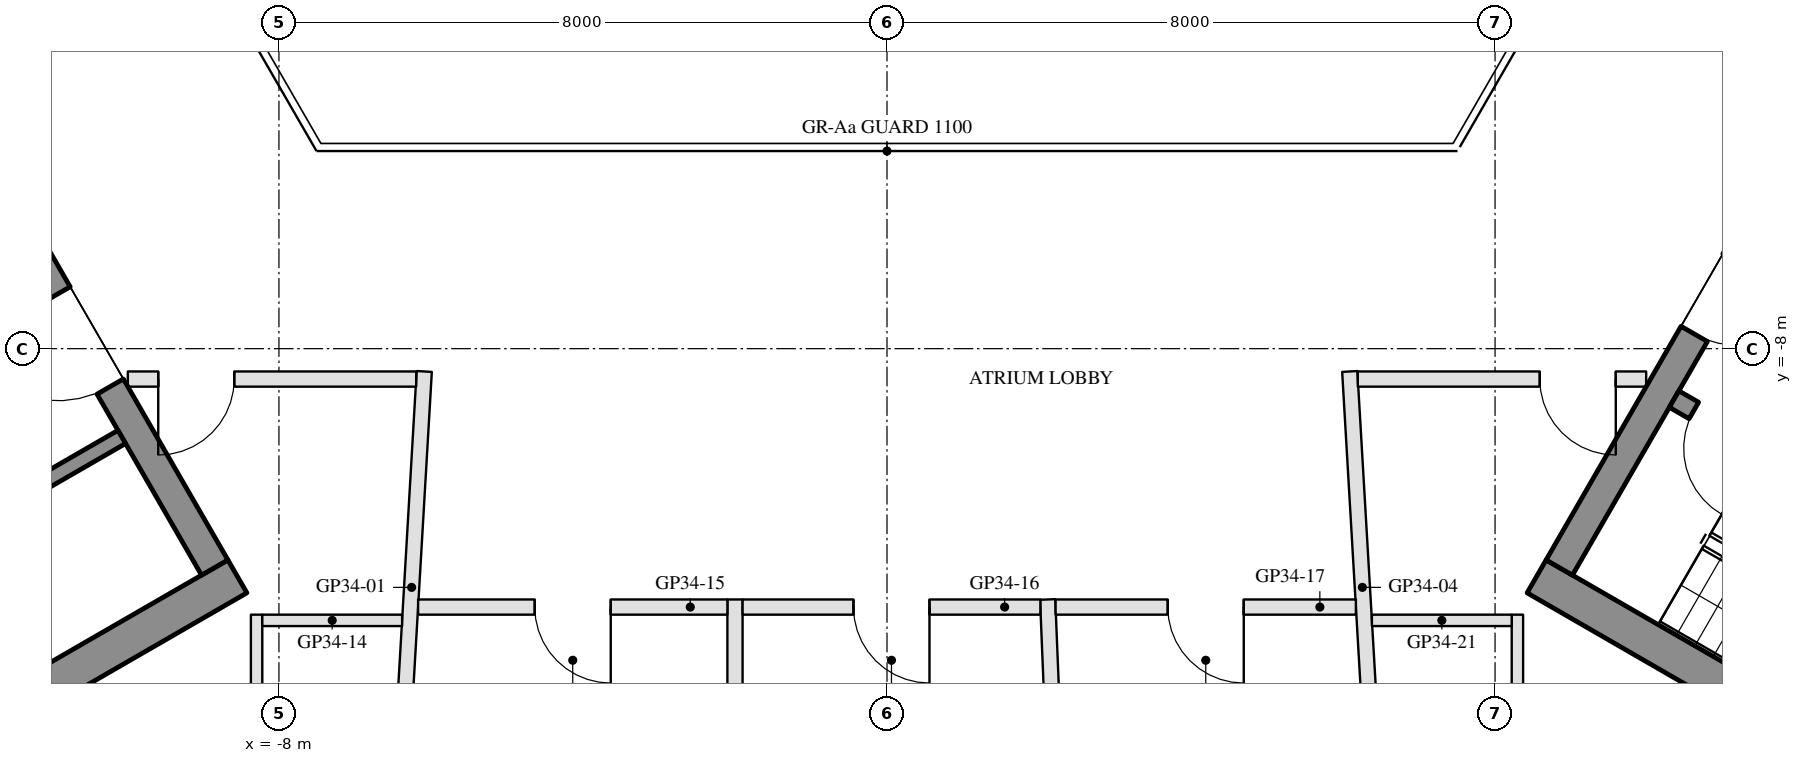
"""IFC4 building model, lengths in metres.
Left out: names, types, materials, properties, quantities, classifications, styles, units other than length and angle.
Written with IfcOpenShell. Run it as: python <this file> out.ifc"""

import sys

from ifc_helpers import new_model, si_unit, direction, frame, frame_2d, origin, place, context, subcontext, project, spatial, rectangle, extrude, element, fill, save


model = new_model("IFC4")
c1 = context("Model", 3, precision=1e-05, world=origin(), true_north=direction((0.0, 1.0)))
c2 = subcontext(c1, "Body", "Model", "MODEL_VIEW")
j1 = project(units=[si_unit("LENGTHUNIT", "METRE"), si_unit("PLANEANGLEUNIT", "RADIAN")], contexts=[c1])
p1 = place(None, origin())
s1 = spatial("IfcSite", under=j1, at=p1, CompositionType="ELEMENT")
p2 = place(p1, origin())
s2 = spatial("IfcBuilding", under=s1, at=p2, CompositionType="ELEMENT")
p3 = place(p2, frame((0.0, 0.0, 320.7)))
s3 = spatial("IfcBuildingStorey", under=s2, at=p3, CompositionType="ELEMENT", Elevation=320.7)
p4 = place(p3, frame((-8.547, -10.997, 0.0), z_axis=(0.0, 0.0, 1.0), x_axis=(-0.866025286072, -0.500000203884, 0.0)))
e1 = element("IfcWall", 1, at=p4, inside=s3, PredefinedType="SHEAR", context=c2, shape_type="SweptSolid", body=[
    extrude(rectangle(XDim=9.283, YDim=0.5, at=frame_2d((4.641, 0.0))), origin(), (0.0, 0.0, 1.0), 3.5),
])
p5 = place(p3, frame((-13.845, -2.22, 0.0), z_axis=(0.0, 0.0, 1.0), x_axis=(0.500004234368, -0.866022959057, 0.0)))
e2 = element("IfcWall", 2, at=p5, inside=s3, PredefinedType="SHEAR", context=c2, shape_type="SweptSolid", body=[
    extrude(rectangle(XDim=10.0, YDim=0.4, at=frame_2d((5.0, 0.0))), origin(), (0.0, 0.0, 1.0), 3.5),
])
p6 = place(p5, frame((3.55, 0.0, 0.0)))
e3 = element("IfcOpeningElement", 3, at=p6, cuts=e2, PredefinedType="OPENING", context=c2, shape_type="SweptSolid", body=[
    extrude(rectangle(XDim=1.1, YDim=2.1, at=frame_2d((0.55, 1.05))), frame((0.0, 0.21, 0.0), z_axis=(0.0, -1.0, 0.0), x_axis=(1.0, 0.0, 0.0)), (0.0, 0.0, 1.0), 0.42),
])
p7 = place(p5, frame((5.85, 0.0, 0.0)))
e4 = element("IfcOpeningElement", 4, at=p7, cuts=e2, PredefinedType="OPENING", context=c2, shape_type="SweptSolid", body=[
    extrude(rectangle(XDim=1.4, YDim=2.1, at=frame_2d((0.7, 1.05))), frame((0.0, 0.21, 0.0), z_axis=(0.0, -1.0, 0.0), x_axis=(1.0, 0.0, 0.0)), (0.0, 0.0, 1.0), 0.42),
])
p8 = place(p3, frame((-10.068, -9.162, 0.0), z_axis=(0.0, 0.0, 1.0), x_axis=(-0.866030125237, -0.499991822116, 0.0)))
e5 = element("IfcWall", 5, at=p8, inside=s3, PredefinedType="SHEAR", context=c2, shape_type="SweptSolid", body=[
    extrude(rectangle(XDim=10.121, YDim=0.2, at=frame_2d((5.061, 0.0))), origin(), (0.0, 0.0, 1.0), 3.5),
])
p9 = place(p8, frame((1.99, 0.0, 0.0)))
e6 = element("IfcOpeningElement", 6, at=p9, cuts=e5, PredefinedType="OPENING", context=c2, shape_type="SweptSolid", body=[
    extrude(rectangle(XDim=0.9, YDim=2.1, at=frame_2d((0.45, 1.05))), frame((0.0, 0.11, 0.0), z_axis=(0.0, -1.0, 0.0), x_axis=(1.0, 0.0, 0.0)), (0.0, 0.0, 1.0), 0.22),
])
p10 = place(p8, frame((7.07, 0.0, 0.0)))
e7 = element("IfcOpeningElement", 7, at=p10, cuts=e5, PredefinedType="OPENING", context=c2, shape_type="SweptSolid", body=[
    extrude(rectangle(XDim=0.9, YDim=2.1, at=frame_2d((0.45, 1.05))), frame((0.0, 0.11, 0.0), z_axis=(0.0, -1.0, 0.0), x_axis=(1.0, 0.0, 0.0)), (0.0, 0.0, 1.0), 0.22),
])
p11 = place(p3, frame((8.547, -10.997, 0.0), z_axis=(0.0, 0.0, 1.0), x_axis=(0.866025286072, -0.500000203884, 0.0)))
e8 = element("IfcWall", 8, at=p11, inside=s3, PredefinedType="SHEAR", context=c2, shape_type="SweptSolid", body=[
    extrude(rectangle(XDim=9.283, YDim=0.5, at=frame_2d((4.641, 0.0))), origin(), (0.0, 0.0, 1.0), 3.5),
])
p12 = place(p3, frame((8.845, -10.88, 0.0), z_axis=(0.0, 0.0, 1.0), x_axis=(0.500004234368, 0.866022959057, 0.0)))
e9 = element("IfcWall", 9, at=p12, inside=s3, PredefinedType="SHEAR", context=c2, shape_type="SweptSolid", body=[
    extrude(rectangle(XDim=10.0, YDim=0.4, at=frame_2d((5.0, 0.0))), origin(), (0.0, 0.0, 1.0), 3.5),
])
p13 = place(p12, frame((3.55, 0.0, 0.0)))
e10 = element("IfcOpeningElement", 10, at=p13, cuts=e9, PredefinedType="OPENING", context=c2, shape_type="SweptSolid", body=[
    extrude(rectangle(XDim=1.1, YDim=2.1, at=frame_2d((0.55, 1.05))), frame((0.0, 0.21, 0.0), z_axis=(0.0, -1.0, 0.0), x_axis=(1.0, 0.0, 0.0)), (0.0, 0.0, 1.0), 0.42),
])
p14 = place(p12, frame((5.85, 0.0, 0.0)))
e11 = element("IfcOpeningElement", 11, at=p14, cuts=e9, PredefinedType="OPENING", context=c2, shape_type="SweptSolid", body=[
    extrude(rectangle(XDim=1.4, YDim=2.1, at=frame_2d((0.7, 1.05))), frame((0.0, 0.21, 0.0), z_axis=(0.0, -1.0, 0.0), x_axis=(1.0, 0.0, 0.0)), (0.0, 0.0, 1.0), 0.42),
])
p15 = place(p3, frame((10.356, -8.664, 0.0), z_axis=(0.0, 0.0, 1.0), x_axis=(0.866028629588, -0.499994412703, 0.0)))
e12 = element("IfcWall", 12, at=p15, inside=s3, PredefinedType="SHEAR", context=c2, shape_type="SweptSolid", body=[
    extrude(rectangle(XDim=6.45, YDim=0.25, at=frame_2d((3.225, 0.0))), origin(), (0.0, 0.0, 1.0), 3.5),
])
p16 = place(p15, frame((0.3, 0.0, 0.0)))
e13 = element("IfcOpeningElement", 13, at=p16, cuts=e12, PredefinedType="OPENING", context=c2, shape_type="SweptSolid", body=[
    extrude(rectangle(XDim=1.0, YDim=2.1, at=frame_2d((0.5, 1.05))), frame((0.0, 0.135, 0.0), z_axis=(0.0, -1.0, 0.0), x_axis=(1.0, 0.0, 0.0)), (0.0, 0.0, 1.0), 0.27),
])
p17 = place(p3, frame((-6.42, -13.982, 0.0), z_axis=(0.0, 0.0, 1.0), x_axis=(0.058254288977, 0.998301776927, 0.0)))
e14 = element("IfcWall", 14, at=p17, inside=s3, PredefinedType="PARTITIONING", context=c2, shape_type="SweptSolid", body=[
    extrude(rectangle(XDim=5.691, YDim=0.2, at=frame_2d((2.846, 0.0))), origin(), (0.0, 0.0, 1.0), 3.15),
])
p18 = place(p3, frame((-2.0, -14.978, 0.0), z_axis=(0.0, 0.0, 1.0), x_axis=(0.0, 1.0, 0.0)))
e15 = element("IfcWall", 15, at=p18, inside=s3, PredefinedType="PARTITIONING", context=c2, shape_type="SweptSolid", body=[
    extrude(rectangle(XDim=3.677, YDim=0.2, at=frame_2d((1.839, 0.0))), origin(), (0.0, 0.0, 1.0), 3.1),
])
p19 = place(p3, frame((2.3, -15.877, 0.0), z_axis=(0.0, 0.0, 1.0), x_axis=(-0.040608643031, 0.999175128849, 0.0)))
e16 = element("IfcWall", 16, at=p19, inside=s3, PredefinedType="PARTITIONING", context=c2, shape_type="SweptSolid", body=[
    extrude(rectangle(XDim=4.581, YDim=0.2, at=frame_2d((2.291, 0.0))), origin(), (0.0, 0.0, 1.0), 3.1),
])
p20 = place(p3, frame((6.42, -13.982, 0.0), z_axis=(0.0, 0.0, 1.0), x_axis=(-0.058254288977, 0.998301776927, 0.0)))
e17 = element("IfcWall", 17, at=p20, inside=s3, PredefinedType="PARTITIONING", context=c2, shape_type="SweptSolid", body=[
    extrude(rectangle(XDim=5.691, YDim=0.2, at=frame_2d((2.846, 0.0))), origin(), (0.0, 0.0, 1.0), 3.15),
])
p21 = place(p3, frame((-6.194, -8.4, 0.0), z_axis=(0.0, 0.0, 1.0), x_axis=(-1.0, 0.0, 0.0)))
e18 = element("IfcWall", 18, at=p21, inside=s3, PredefinedType="PARTITIONING", context=c2, shape_type="SweptSolid", body=[
    extrude(rectangle(XDim=3.794, YDim=0.2, at=frame_2d((1.897, 0.0))), origin(), (0.0, 0.0, 1.0), 3.15),
])
p22 = place(p21, frame((2.394, 0.0, 0.0)))
e19 = element("IfcOpeningElement", 19, at=p22, cuts=e18, PredefinedType="OPENING", context=c2, shape_type="SweptSolid", body=[
    extrude(rectangle(XDim=1.0, YDim=2.1, at=frame_2d((0.5, 1.05))), frame((0.0, 0.11, 0.0), z_axis=(0.0, -1.0, 0.0), x_axis=(1.0, 0.0, 0.0)), (0.0, 0.0, 1.0), 0.22),
])
p23 = place(p3, frame((-8.294, -11.5, 0.0), z_axis=(0.0, 0.0, 1.0), x_axis=(0.0, -1.0, 0.0)))
e20 = element("IfcWall", 20, at=p23, inside=s3, PredefinedType="PARTITIONING", context=c2, shape_type="SweptSolid", body=[
    extrude(rectangle(XDim=2.8, YDim=0.15, at=frame_2d((1.4, 0.0))), origin(), (0.0, 0.0, 1.0), 3.1),
])
p24 = place(p23, frame((1.4, 0.0, 0.0)))
e21 = element("IfcOpeningElement", 21, at=p24, cuts=e20, PredefinedType="OPENING", context=c2, shape_type="SweptSolid", body=[
    extrude(rectangle(XDim=0.9, YDim=2.1, at=frame_2d((0.45, 1.05))), frame((0.0, 0.085, 0.0), z_axis=(0.0, -1.0, 0.0), x_axis=(1.0, 0.0, 0.0)), (0.0, 0.0, 1.0), 0.17),
])
p25 = place(p3, frame((-8.219, -11.575, 0.0), z_axis=(0.0, 0.0, 1.0), x_axis=(1.0, 0.0, 0.0)))
e22 = element("IfcWall", 22, at=p25, inside=s3, PredefinedType="PARTITIONING", context=c2, shape_type="SweptSolid", body=[
    extrude(rectangle(XDim=1.839, YDim=0.15, at=frame_2d((0.92, 0.0))), origin(), (0.0, 0.0, 1.0), 3.15),
])
p26 = place(p3, frame((-2.1, -11.4, 0.0), z_axis=(0.0, 0.0, 1.0), x_axis=(-1.0, 0.0, 0.0)))
e23 = element("IfcWall", 23, at=p26, inside=s3, PredefinedType="PARTITIONING", context=c2, shape_type="SweptSolid", body=[
    extrude(rectangle(XDim=4.069, YDim=0.2, at=frame_2d((2.035, 0.0))), origin(), (0.0, 0.0, 1.0), 3.15),
])
p27 = place(p26, frame((1.535, 0.0, 0.0)))
e24 = element("IfcOpeningElement", 24, at=p27, cuts=e23, PredefinedType="OPENING", context=c2, shape_type="SweptSolid", body=[
    extrude(rectangle(XDim=1.0, YDim=2.1, at=frame_2d((0.5, 1.05))), frame((0.0, 0.11, 0.0), z_axis=(0.0, -1.0, 0.0), x_axis=(1.0, 0.0, 0.0)), (0.0, 0.0, 1.0), 0.22),
])
p28 = place(p3, frame((2.018, -11.4, 0.0), z_axis=(0.0, 0.0, 1.0), x_axis=(-1.0, 0.0, 0.0)))
e25 = element("IfcWall", 25, at=p28, inside=s3, PredefinedType="PARTITIONING", context=c2, shape_type="SweptSolid", body=[
    extrude(rectangle(XDim=3.918, YDim=0.2, at=frame_2d((1.959, 0.0))), origin(), (0.0, 0.0, 1.0), 3.15),
])
p29 = place(p28, frame((1.459, 0.0, 0.0)))
e26 = element("IfcOpeningElement", 26, at=p29, cuts=e25, PredefinedType="OPENING", context=c2, shape_type="SweptSolid", body=[
    extrude(rectangle(XDim=1.0, YDim=2.1, at=frame_2d((0.5, 1.05))), frame((0.0, 0.11, 0.0), z_axis=(0.0, -1.0, 0.0), x_axis=(1.0, 0.0, 0.0)), (0.0, 0.0, 1.0), 0.22),
])
p30 = place(p3, frame((6.169, -11.4, 0.0), z_axis=(0.0, 0.0, 1.0), x_axis=(-1.0, 0.0, 0.0)))
e27 = element("IfcWall", 27, at=p30, inside=s3, PredefinedType="PARTITIONING", context=c2, shape_type="SweptSolid", body=[
    extrude(rectangle(XDim=3.951, YDim=0.2, at=frame_2d((1.976, 0.0))), origin(), (0.0, 0.0, 1.0), 3.15),
])
p31 = place(p30, frame((1.476, 0.0, 0.0)))
e28 = element("IfcOpeningElement", 28, at=p31, cuts=e27, PredefinedType="OPENING", context=c2, shape_type="SweptSolid", body=[
    extrude(rectangle(XDim=1.0, YDim=2.1, at=frame_2d((0.5, 1.05))), frame((0.0, 0.11, 0.0), z_axis=(0.0, -1.0, 0.0), x_axis=(1.0, 0.0, 0.0)), (0.0, 0.0, 1.0), 0.22),
])
p32 = place(p3, frame((9.988, -8.4, 0.0), z_axis=(0.0, 0.0, 1.0), x_axis=(-1.0, 0.0, 0.0)))
e29 = element("IfcWall", 29, at=p32, inside=s3, PredefinedType="PARTITIONING", context=c2, shape_type="SweptSolid", body=[
    extrude(rectangle(XDim=3.794, YDim=0.2, at=frame_2d((1.897, 0.0))), origin(), (0.0, 0.0, 1.0), 3.15),
])
p33 = place(p32, frame((0.4, 0.0, 0.0)))
e30 = element("IfcOpeningElement", 30, at=p33, cuts=e29, PredefinedType="OPENING", context=c2, shape_type="SweptSolid", body=[
    extrude(rectangle(XDim=1.0, YDim=2.1, at=frame_2d((0.5, 1.05))), frame((0.0, 0.11, 0.0), z_axis=(0.0, -1.0, 0.0), x_axis=(1.0, 0.0, 0.0)), (0.0, 0.0, 1.0), 0.22),
])
p34 = place(p3, frame((8.294, -14.3, 0.0), z_axis=(0.0, 0.0, 1.0), x_axis=(0.0, 1.0, 0.0)))
e31 = element("IfcWall", 31, at=p34, inside=s3, PredefinedType="PARTITIONING", context=c2, shape_type="SweptSolid", body=[
    extrude(rectangle(XDim=2.8, YDim=0.15, at=frame_2d((1.4, 0.0))), origin(), (0.0, 0.0, 1.0), 3.1),
])
p35 = place(p34, frame((0.5, 0.0, 0.0)))
e32 = element("IfcOpeningElement", 32, at=p35, cuts=e31, PredefinedType="OPENING", context=c2, shape_type="SweptSolid", body=[
    extrude(rectangle(XDim=0.9, YDim=2.1, at=frame_2d((0.45, 1.05))), frame((0.0, 0.085, 0.0), z_axis=(0.0, -1.0, 0.0), x_axis=(1.0, 0.0, 0.0)), (0.0, 0.0, 1.0), 0.17),
])
p36 = place(p3, frame((6.38, -11.575, 0.0), z_axis=(0.0, 0.0, 1.0), x_axis=(1.0, 0.0, 0.0)))
e33 = element("IfcWall", 33, at=p36, inside=s3, PredefinedType="PARTITIONING", context=c2, shape_type="SweptSolid", body=[
    extrude(rectangle(XDim=1.839, YDim=0.15, at=frame_2d((0.92, 0.0))), origin(), (0.0, 0.0, 1.0), 3.15),
])
p37 = place(p3, frame((10.025, -0.563, 0.0), z_axis=(0.0, 0.0, 1.0), x_axis=(0.500000259638, -0.866025253883, 0.0)))
e34 = element("IfcWall", 34, at=p37, inside=s3, PredefinedType="PARTITIONING", context=c2, shape_type="SweptSolid", body=[
    extrude(rectangle(XDim=4.488, YDim=0.2, at=frame_2d((2.244, 0.0))), origin(), (0.0, 0.0, 1.0), 3.15),
])
p38 = place(p37, frame((2.45, 0.0, 0.0)))
e35 = element("IfcOpeningElement", 35, at=p38, cuts=e34, PredefinedType="OPENING", context=c2, shape_type="SweptSolid", body=[
    extrude(rectangle(XDim=1.0, YDim=2.1, at=frame_2d((0.5, 1.05))), frame((0.0, 0.11, 0.0), z_axis=(0.0, -1.0, 0.0), x_axis=(1.0, 0.0, 0.0)), (0.0, 0.0, 1.0), 0.22),
])
p39 = place(p3, frame((-12.269, -4.45, 0.0), z_axis=(0.0, 0.0, 1.0), x_axis=(0.500034087201, 0.866005722635, 0.0)))
e36 = element("IfcWall", 36, at=p39, inside=s3, PredefinedType="PARTITIONING", context=c2, shape_type="SweptSolid", body=[
    extrude(rectangle(XDim=5.696, YDim=0.2, at=frame_2d((2.848, 0.0))), origin(), (0.0, 0.0, 1.0), 3.15),
])
p40 = place(p39, frame((2.238, 0.0, 0.0)))
e37 = element("IfcOpeningElement", 37, at=p40, cuts=e36, PredefinedType="OPENING", context=c2, shape_type="SweptSolid", body=[
    extrude(rectangle(XDim=1.0, YDim=2.1, at=frame_2d((0.5, 1.05))), frame((0.0, 0.11, 0.0), z_axis=(0.0, -1.0, 0.0), x_axis=(1.0, 0.0, 0.0)), (0.0, 0.0, 1.0), 0.22),
])
p41 = place(p7, frame((1.4, 0.0, 0.0), z_axis=(0.0, 0.0, 1.0), x_axis=(-1.0, 0.0, 0.0)))
e38 = element("IfcDoor", 38, at=p41, inside=s3, OperationType="DOUBLE_DOOR_SINGLE_SWING", PredefinedType="DOOR", context=c2, shape_type="SweptSolid", body=[
    extrude(rectangle(XDim=1.4, YDim=2.1, at=frame_2d((0.7, 1.05))), frame((0.0, 0.025, 0.0), z_axis=(0.0, -1.0, 0.0), x_axis=(1.0, 0.0, 0.0)), (0.0, 0.0, 1.0), 0.05),
])
fill(e4, e38)
p42 = place(p13, frame((1.1, 0.0, 0.0), z_axis=(0.0, 0.0, 1.0), x_axis=(-1.0, 0.0, 0.0)))
e39 = element("IfcDoor", 39, at=p42, inside=s3, OperationType="SINGLE_SWING_LEFT", PredefinedType="DOOR", context=c2, shape_type="SweptSolid", body=[
    extrude(rectangle(XDim=1.1, YDim=2.1, at=frame_2d((0.55, 1.05))), frame((0.0, 0.025, 0.0), z_axis=(0.0, -1.0, 0.0), x_axis=(1.0, 0.0, 0.0)), (0.0, 0.0, 1.0), 0.05),
])
fill(e10, e39)
p43 = place(p16, frame((1.0, 0.0, 0.0), z_axis=(0.0, 0.0, 1.0), x_axis=(-1.0, 0.0, 0.0)))
e40 = element("IfcDoor", 40, at=p43, inside=s3, OperationType="SINGLE_SWING_LEFT", PredefinedType="DOOR", context=c2, shape_type="SweptSolid", body=[
    extrude(rectangle(XDim=1.0, YDim=2.1, at=frame_2d((0.5, 1.05))), frame((0.0, 0.025, 0.0), z_axis=(0.0, -1.0, 0.0), x_axis=(1.0, 0.0, 0.0)), (0.0, 0.0, 1.0), 0.05),
])
fill(e13, e40)
p44 = place(p22, origin())
e41 = element("IfcDoor", 41, at=p44, inside=s3, OperationType="SINGLE_SWING_RIGHT", PredefinedType="DOOR", context=c2, shape_type="SweptSolid", body=[
    extrude(rectangle(XDim=1.0, YDim=2.1, at=frame_2d((0.5, 1.05))), frame((0.0, 0.025, 0.0), z_axis=(0.0, -1.0, 0.0), x_axis=(1.0, 0.0, 0.0)), (0.0, 0.0, 1.0), 0.05),
])
fill(e19, e41)
p45 = place(p27, origin())
e42 = element("IfcDoor", 42, at=p45, inside=s3, OperationType="SINGLE_SWING_LEFT", PredefinedType="DOOR", context=c2, shape_type="SweptSolid", body=[
    extrude(rectangle(XDim=1.0, YDim=2.1, at=frame_2d((0.5, 1.05))), frame((0.0, 0.025, 0.0), z_axis=(0.0, -1.0, 0.0), x_axis=(1.0, 0.0, 0.0)), (0.0, 0.0, 1.0), 0.05),
])
fill(e24, e42)
p46 = place(p29, origin())
e43 = element("IfcDoor", 43, at=p46, inside=s3, OperationType="SINGLE_SWING_LEFT", PredefinedType="DOOR", context=c2, shape_type="SweptSolid", body=[
    extrude(rectangle(XDim=1.0, YDim=2.1, at=frame_2d((0.5, 1.05))), frame((0.0, 0.025, 0.0), z_axis=(0.0, -1.0, 0.0), x_axis=(1.0, 0.0, 0.0)), (0.0, 0.0, 1.0), 0.05),
])
fill(e26, e43)
p47 = place(p31, origin())
e44 = element("IfcDoor", 44, at=p47, inside=s3, OperationType="SINGLE_SWING_LEFT", PredefinedType="DOOR", context=c2, shape_type="SweptSolid", body=[
    extrude(rectangle(XDim=1.0, YDim=2.1, at=frame_2d((0.5, 1.05))), frame((0.0, 0.025, 0.0), z_axis=(0.0, -1.0, 0.0), x_axis=(1.0, 0.0, 0.0)), (0.0, 0.0, 1.0), 0.05),
])
fill(e28, e44)
p48 = place(p33, origin())
e45 = element("IfcDoor", 45, at=p48, inside=s3, OperationType="SINGLE_SWING_LEFT", PredefinedType="DOOR", context=c2, shape_type="SweptSolid", body=[
    extrude(rectangle(XDim=1.0, YDim=2.1, at=frame_2d((0.5, 1.05))), frame((0.0, 0.025, 0.0), z_axis=(0.0, -1.0, 0.0), x_axis=(1.0, 0.0, 0.0)), (0.0, 0.0, 1.0), 0.05),
])
fill(e30, e45)
save(model, sys.argv[1])
